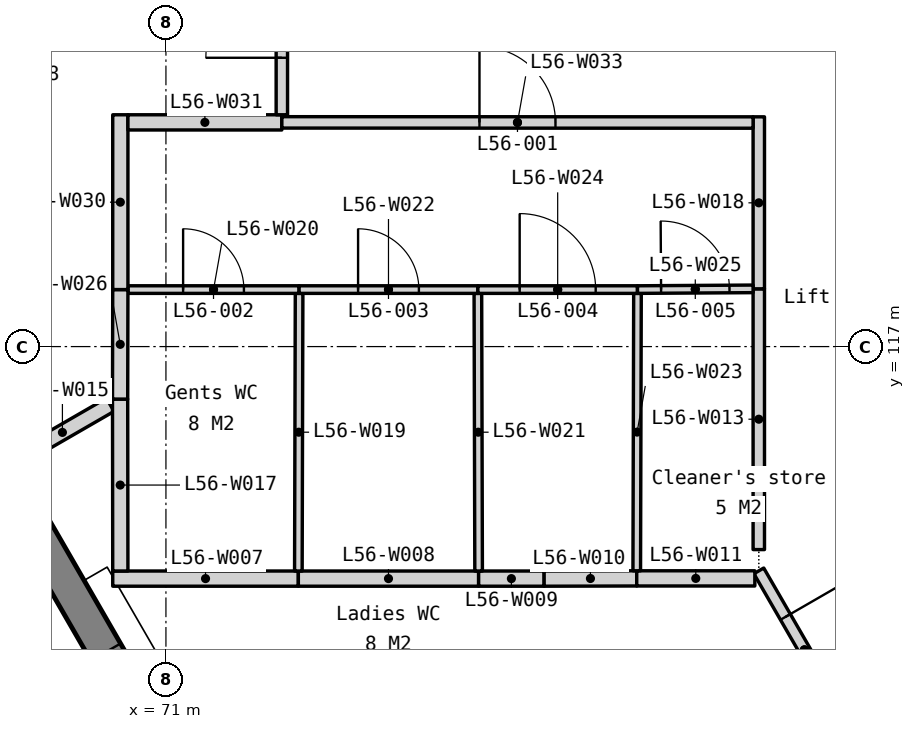
"""IFC4 building model, lengths in metres.
Left out: names, types, materials, properties, quantities, classifications, styles, units other than length and angle.
Written with IfcOpenShell. Run it as: python <this file> out.ifc"""

import sys

from ifc_helpers import new_model, si_unit, direction, frame, frame_2d, origin, place, context, subcontext, project, spatial, polyline, rectangle, outline, extrude, element, fill, save


model = new_model("IFC4")
c1 = context("Model", 3, precision=1e-05, world=origin(), true_north=direction((0.0, 1.0)))
c2 = subcontext(c1, "Body", "Model", "MODEL_VIEW")
j1 = project(units=[si_unit("LENGTHUNIT", "METRE"), si_unit("PLANEANGLEUNIT", "RADIAN")], contexts=[c1])
p1 = place(None, origin())
s1 = spatial("IfcSite", under=j1, at=p1, CompositionType="ELEMENT")
p2 = place(p1, origin())
s2 = spatial("IfcBuilding", under=s1, at=p2, CompositionType="ELEMENT")
p3 = place(p2, frame((0.0, 0.0, 223.1)))
s3 = spatial("IfcBuildingStorey", under=s2, at=p3, CompositionType="ELEMENT", Elevation=223.1)
p4 = place(p3, frame((59.13, 132.168, -0.15), z_axis=(0.0, 0.0, 1.0), x_axis=(0.500002199942, -0.866024133644, 0.0)))
e1 = element("IfcWall", 1, at=p4, inside=s3, PredefinedType="SOLIDWALL", context=c2, shape_type="SweptSolid", body=[
    extrude(outline(polyline([(38.729, 0.0), (38.729, 3.75), (0.0, 3.75), (0.0, 0.0), (38.729, 0.0)])), frame((0.0, 0.225, 0.0), z_axis=(0.0, -1.0, 0.0), x_axis=(1.0, 0.0, 0.0)), (0.0, 0.0, 1.0), 0.45),
])
p5 = place(p4, frame((2.791, 0.0, 0.95)))
e2 = element("IfcOpeningElement", 2, at=p5, cuts=e1, PredefinedType="OPENING", context=c2, shape_type="SweptSolid", body=[
    extrude(rectangle(XDim=1.8, YDim=2.2, at=frame_2d((0.9, 1.1))), frame((0.0, 0.235, 0.0), z_axis=(0.0, -1.0, 0.0), x_axis=(1.0, 0.0, 0.0)), (0.0, 0.0, 1.0), 0.47),
])
p6 = place(p4, frame((5.091, 0.0, 0.95)))
e3 = element("IfcOpeningElement", 3, at=p6, cuts=e1, PredefinedType="OPENING", context=c2, shape_type="SweptSolid", body=[
    extrude(rectangle(XDim=1.8, YDim=2.2, at=frame_2d((0.9, 1.1))), frame((0.0, 0.235, 0.0), z_axis=(0.0, -1.0, 0.0), x_axis=(1.0, 0.0, 0.0)), (0.0, 0.0, 1.0), 0.47),
])
p7 = place(p4, frame((12.473, 0.0, 0.95)))
e4 = element("IfcOpeningElement", 4, at=p7, cuts=e1, PredefinedType="OPENING", context=c2, shape_type="SweptSolid", body=[
    extrude(rectangle(XDim=1.8, YDim=2.2, at=frame_2d((0.9, 1.1))), frame((0.0, 0.235, 0.0), z_axis=(0.0, -1.0, 0.0), x_axis=(1.0, 0.0, 0.0)), (0.0, 0.0, 1.0), 0.47),
])
p8 = place(p4, frame((14.773, 0.0, 0.95)))
e5 = element("IfcOpeningElement", 5, at=p8, cuts=e1, PredefinedType="OPENING", context=c2, shape_type="SweptSolid", body=[
    extrude(rectangle(XDim=1.8, YDim=2.2, at=frame_2d((0.9, 1.1))), frame((0.0, 0.235, 0.0), z_axis=(0.0, -1.0, 0.0), x_axis=(1.0, 0.0, 0.0)), (0.0, 0.0, 1.0), 0.47),
])
p9 = place(p4, frame((22.156, 0.0, 0.95)))
e6 = element("IfcOpeningElement", 6, at=p9, cuts=e1, PredefinedType="OPENING", context=c2, shape_type="SweptSolid", body=[
    extrude(rectangle(XDim=1.8, YDim=2.2, at=frame_2d((0.9, 1.1))), frame((0.0, 0.235, 0.0), z_axis=(0.0, -1.0, 0.0), x_axis=(1.0, 0.0, 0.0)), (0.0, 0.0, 1.0), 0.47),
])
p10 = place(p4, frame((24.456, 0.0, 0.95)))
e7 = element("IfcOpeningElement", 7, at=p10, cuts=e1, PredefinedType="OPENING", context=c2, shape_type="SweptSolid", body=[
    extrude(rectangle(XDim=1.8, YDim=2.2, at=frame_2d((0.9, 1.1))), frame((0.0, 0.235, 0.0), z_axis=(0.0, -1.0, 0.0), x_axis=(1.0, 0.0, 0.0)), (0.0, 0.0, 1.0), 0.47),
])
p11 = place(p4, frame((31.838, 0.0, 0.95)))
e8 = element("IfcOpeningElement", 8, at=p11, cuts=e1, PredefinedType="OPENING", context=c2, shape_type="SweptSolid", body=[
    extrude(rectangle(XDim=1.8, YDim=2.2, at=frame_2d((0.9, 1.1))), frame((0.0, 0.235, 0.0), z_axis=(0.0, -1.0, 0.0), x_axis=(1.0, 0.0, 0.0)), (0.0, 0.0, 1.0), 0.47),
])
p12 = place(p4, frame((34.138, 0.0, 0.95)))
e9 = element("IfcOpeningElement", 9, at=p12, cuts=e1, PredefinedType="OPENING", context=c2, shape_type="SweptSolid", body=[
    extrude(rectangle(XDim=1.8, YDim=2.2, at=frame_2d((0.9, 1.1))), frame((0.0, 0.235, 0.0), z_axis=(0.0, -1.0, 0.0), x_axis=(1.0, 0.0, 0.0)), (0.0, 0.0, 1.0), 0.47),
])
p13 = place(p3, frame((78.8, 114.049, 0.0), z_axis=(0.0, 0.0, 1.0), x_axis=(0.500001309137, -0.866024647952, 0.0)))
e10 = element("IfcWall", 10, at=p13, inside=s3, PredefinedType="PARTITIONING", context=c2, shape_type="SweptSolid", body=[
    extrude(rectangle(XDim=2.4, YDim=0.15, at=frame_2d((1.2, 0.0))), origin(), (0.0, 0.0, 1.0), 3.6),
])
p14 = place(p13, frame((0.7, 0.0, 0.0)))
e11 = element("IfcOpeningElement", 11, at=p14, cuts=e10, PredefinedType="OPENING", context=c2, shape_type="SweptSolid", body=[
    extrude(rectangle(XDim=1.0, YDim=2.1, at=frame_2d((0.5, 1.05))), frame((0.0, 0.085, 0.0), z_axis=(0.0, -1.0, 0.0), x_axis=(1.0, 0.0, 0.0)), (0.0, 0.0, 1.0), 0.17),
])
p15 = place(p3, frame((70.3, 113.947, 0.0), z_axis=(0.0, 0.0, 1.0), x_axis=(1.0, 0.0, 0.0)))
e12 = element("IfcWall", 12, at=p15, inside=s3, PredefinedType="PARTITIONING", context=c2, shape_type="SweptSolid", body=[
    extrude(rectangle(XDim=2.442, YDim=0.2, at=frame_2d((1.221, 0.0))), origin(), (0.0, 0.0, 1.0), 3.6),
])
p16 = place(p3, frame((72.742, 113.947, 0.0), z_axis=(0.0, 0.0, 1.0), x_axis=(1.0, 0.0, 0.0)))
e13 = element("IfcWall", 13, at=p16, inside=s3, PredefinedType="PARTITIONING", context=c2, shape_type="SweptSolid", body=[
    extrude(rectangle(XDim=2.372, YDim=0.2, at=frame_2d((1.186, 0.0))), origin(), (0.0, 0.0, 1.0), 3.6),
])
p17 = place(p3, frame((75.114, 113.947, 0.0), z_axis=(0.0, 0.0, 1.0), x_axis=(1.0, 0.0, 0.0)))
e14 = element("IfcWall", 14, at=p17, inside=s3, PredefinedType="PARTITIONING", context=c2, shape_type="SweptSolid", body=[
    extrude(rectangle(XDim=0.862, YDim=0.2, at=frame_2d((0.431, 0.0))), origin(), (0.0, 0.0, 1.0), 3.6),
])
p18 = place(p3, frame((75.976, 113.947, 0.0), z_axis=(0.0, 0.0, 1.0), x_axis=(0.999997107299, 0.002405284684, 0.0)))
e15 = element("IfcWall", 15, at=p18, inside=s3, PredefinedType="PARTITIONING", context=c2, shape_type="SweptSolid", body=[
    extrude(rectangle(XDim=1.218, YDim=0.2, at=frame_2d((0.609, 0.0))), origin(), (0.0, 0.0, 1.0), 3.6),
])
p19 = place(p3, frame((77.194, 113.95, 0.0), z_axis=(0.0, 0.0, 1.0), x_axis=(1.0, 0.0, 0.0)))
e16 = element("IfcWall", 16, at=p19, inside=s3, PredefinedType="PARTITIONING", context=c2, shape_type="SweptSolid", body=[
    extrude(rectangle(XDim=1.554, YDim=0.2, at=frame_2d((0.777, 0.0))), origin(), (0.0, 0.0, 1.0), 3.6),
])
p20 = place(p3, frame((78.8, 114.329, 0.0), z_axis=(0.0, 0.0, 1.0), x_axis=(0.0, 1.0, 0.0)))
e17 = element("IfcWall", 17, at=p20, inside=s3, PredefinedType="PARTITIONING", context=c2, shape_type="SweptSolid", body=[
    extrude(rectangle(XDim=3.431, YDim=0.15, at=frame_2d((1.716, 0.0))), origin(), (0.0, 0.0, 1.0), 3.6),
])
p21 = place(p3, frame((69.009, 115.508, 0.0), z_axis=(0.0, 0.0, 1.0), x_axis=(0.865958882005, 0.500115201406, 0.0)))
e18 = element("IfcWall", 18, at=p21, inside=s3, PredefinedType="PARTITIONING", context=c2, shape_type="SweptSolid", body=[
    extrude(rectangle(XDim=1.453, YDim=0.2, at=frame_2d((0.727, 0.0))), origin(), (0.0, 0.0, 1.0), 3.6),
])
p22 = place(p3, frame((70.4, 114.047, 0.0), z_axis=(0.0, 0.0, 1.0), x_axis=(-0.001295195892, 0.999999161233, 0.0)))
e19 = element("IfcWall", 19, at=p22, inside=s3, PredefinedType="PARTITIONING", context=c2, shape_type="SweptSolid", body=[
    extrude(rectangle(XDim=2.262, YDim=0.2, at=frame_2d((1.131, 0.0))), origin(), (0.0, 0.0, 1.0), 3.6),
])
p23 = place(p3, frame((78.8, 117.76, 0.0), z_axis=(0.0, 0.0, 1.0), x_axis=(0.0, 1.0, 0.0)))
e20 = element("IfcWall", 20, at=p23, inside=s3, PredefinedType="PARTITIONING", context=c2, shape_type="SweptSolid", body=[
    extrude(rectangle(XDim=2.263, YDim=0.15, at=frame_2d((1.131, 0.0))), origin(), (0.0, 0.0, 1.0), 3.6),
])
p24 = place(p3, frame((72.742, 114.047, 0.0), z_axis=(0.0, 0.0, 1.0), x_axis=(0.002673429826, 0.99999642638, 0.0)))
e21 = element("IfcWall", 21, at=p24, inside=s3, PredefinedType="PARTITIONING", context=c2, shape_type="SweptSolid", body=[
    extrude(rectangle(XDim=3.653, YDim=0.1, at=frame_2d((1.826, 0.0))), origin(), (0.0, 0.0, 1.0), 3.6),
])
p25 = place(p3, frame((70.5, 117.75, 0.0), z_axis=(0.0, 0.0, 1.0), x_axis=(1.0, 0.0, 0.0)))
e22 = element("IfcWall", 22, at=p25, inside=s3, PredefinedType="PARTITIONING", context=c2, shape_type="SweptSolid", body=[
    extrude(rectangle(XDim=2.252, YDim=0.1, at=frame_2d((1.126, 0.0))), origin(), (0.0, 0.0, 1.0), 3.6),
])
p26 = place(p25, frame((0.726, 0.0, 0.0)))
e23 = element("IfcOpeningElement", 23, at=p26, cuts=e22, PredefinedType="OPENING", context=c2, shape_type="SweptSolid", body=[
    extrude(rectangle(XDim=0.8, YDim=2.1, at=frame_2d((0.4, 1.05))), frame((0.0, 0.06, 0.0), z_axis=(0.0, -1.0, 0.0), x_axis=(1.0, 0.0, 0.0)), (0.0, 0.0, 1.0), 0.12),
])
p27 = place(p3, frame((75.114, 114.047, 0.0), z_axis=(0.0, 0.0, 1.0), x_axis=(-0.00260659454, 0.999996602827, 0.0)))
e24 = element("IfcWall", 24, at=p27, inside=s3, PredefinedType="PARTITIONING", context=c2, shape_type="SweptSolid", body=[
    extrude(rectangle(XDim=3.653, YDim=0.1, at=frame_2d((1.826, 0.0))), origin(), (0.0, 0.0, 1.0), 3.6),
])
p28 = place(p3, frame((72.752, 117.75, 0.0), z_axis=(0.0, 0.0, 1.0), x_axis=(1.0, 0.0, 0.0)))
e25 = element("IfcWall", 25, at=p28, inside=s3, PredefinedType="PARTITIONING", context=c2, shape_type="SweptSolid", body=[
    extrude(rectangle(XDim=2.352, YDim=0.1, at=frame_2d((1.176, 0.0))), origin(), (0.0, 0.0, 1.0), 3.6),
])
p29 = place(p28, frame((0.776, 0.0, 0.0)))
e26 = element("IfcOpeningElement", 26, at=p29, cuts=e25, PredefinedType="OPENING", context=c2, shape_type="SweptSolid", body=[
    extrude(rectangle(XDim=0.8, YDim=2.1, at=frame_2d((0.4, 1.05))), frame((0.0, 0.06, 0.0), z_axis=(0.0, -1.0, 0.0), x_axis=(1.0, 0.0, 0.0)), (0.0, 0.0, 1.0), 0.12),
])
p30 = place(p3, frame((77.194, 114.05, 0.0), z_axis=(0.0, 0.0, 1.0), x_axis=(0.002608686776, 0.999996597371, 0.0)))
e27 = element("IfcWall", 27, at=p30, inside=s3, PredefinedType="PARTITIONING", context=c2, shape_type="SweptSolid", body=[
    extrude(rectangle(XDim=3.65, YDim=0.1, at=frame_2d((1.825, 0.0))), origin(), (0.0, 0.0, 1.0), 3.6),
])
p31 = place(p3, frame((75.104, 117.75, 0.0), z_axis=(0.0, 0.0, 1.0), x_axis=(1.0, 0.0, 0.0)))
e28 = element("IfcWall", 28, at=p31, inside=s3, PredefinedType="PARTITIONING", context=c2, shape_type="SweptSolid", body=[
    extrude(rectangle(XDim=2.1, YDim=0.1, at=frame_2d((1.05, 0.0))), origin(), (0.0, 0.0, 1.0), 3.6),
])
p32 = place(p31, frame((0.55, 0.0, 0.0)))
e29 = element("IfcOpeningElement", 29, at=p32, cuts=e28, PredefinedType="OPENING", context=c2, shape_type="SweptSolid", body=[
    extrude(rectangle(XDim=1.0, YDim=2.1, at=frame_2d((0.5, 1.05))), frame((0.0, 0.06, 0.0), z_axis=(0.0, -1.0, 0.0), x_axis=(1.0, 0.0, 0.0)), (0.0, 0.0, 1.0), 0.12),
])
p33 = place(p3, frame((77.204, 117.75, 0.0), z_axis=(0.0, 0.0, 1.0), x_axis=(0.999980406575, 0.006259909447, 0.0)))
e30 = element("IfcWall", 30, at=p33, inside=s3, PredefinedType="PARTITIONING", context=c2, shape_type="SweptSolid", body=[
    extrude(rectangle(XDim=1.521, YDim=0.1, at=frame_2d((0.76, 0.0))), origin(), (0.0, 0.0, 1.0), 3.6),
])
p34 = place(p33, frame((0.311, 0.0, 0.0)))
e31 = element("IfcOpeningElement", 31, at=p34, cuts=e30, PredefinedType="OPENING", context=c2, shape_type="SweptSolid", body=[
    extrude(rectangle(XDim=0.9, YDim=2.1, at=frame_2d((0.45, 1.05))), frame((0.0, 0.06, 0.0), z_axis=(0.0, -1.0, 0.0), x_axis=(1.0, 0.0, 0.0)), (0.0, 0.0, 1.0), 0.12),
])
p35 = place(p3, frame((70.397, 116.309, 0.0), z_axis=(0.0, 0.0, 1.0), x_axis=(0.002033204879, 0.999997933037, 0.0)))
e32 = element("IfcWall", 32, at=p35, inside=s3, PredefinedType="PARTITIONING", context=c2, shape_type="SweptSolid", body=[
    extrude(rectangle(XDim=1.441, YDim=0.2, at=frame_2d((0.72, 0.0))), origin(), (0.0, 0.0, 1.0), 3.6),
])
p36 = place(p3, frame((66.587, 119.703, 0.0), z_axis=(0.0, 0.0, 1.0), x_axis=(0.866023511746, 0.500003277092, 0.0)))
e33 = element("IfcWall", 33, at=p36, inside=s3, PredefinedType="PARTITIONING", context=c2, shape_type="SweptSolid", body=[
    extrude(rectangle(XDim=5.694, YDim=0.1, at=frame_2d((2.847, 0.0))), origin(), (0.0, 0.0, 1.0), 3.6),
])
p37 = place(p36, frame((2.397, 0.0, 0.0)))
e34 = element("IfcOpeningElement", 34, at=p37, cuts=e33, PredefinedType="OPENING", context=c2, shape_type="SweptSolid", body=[
    extrude(rectangle(XDim=0.9, YDim=2.1, at=frame_2d((0.45, 1.05))), frame((0.0, 0.06, 0.0), z_axis=(0.0, -1.0, 0.0), x_axis=(1.0, 0.0, 0.0)), (0.0, 0.0, 1.0), 0.12),
])
p38 = place(p3, frame((70.4, 117.75, 0.0), z_axis=(0.0, 0.0, 1.0), x_axis=(0.0, 1.0, 0.0)))
e35 = element("IfcWall", 35, at=p38, inside=s3, PredefinedType="PARTITIONING", context=c2, shape_type="SweptSolid", body=[
    extrude(rectangle(XDim=2.3, YDim=0.2, at=frame_2d((1.15, 0.0))), origin(), (0.0, 0.0, 1.0), 3.6),
])
p39 = place(p3, frame((70.5, 119.95, 0.0), z_axis=(0.0, 0.0, 1.0), x_axis=(1.0, 0.0, 0.0)))
e36 = element("IfcWall", 36, at=p39, inside=s3, PredefinedType="PARTITIONING", context=c2, shape_type="SweptSolid", body=[
    extrude(rectangle(XDim=2.025, YDim=0.2, at=frame_2d((1.012, 0.0))), origin(), (0.0, 0.0, 1.0), 3.6),
])
p40 = place(p3, frame((72.525, 120.05, 0.0), z_axis=(0.0, 0.0, 1.0), x_axis=(0.0, 1.0, 0.0)))
e37 = element("IfcWall", 37, at=p40, inside=s3, PredefinedType="PARTITIONING", context=c2, shape_type="SweptSolid", body=[
    extrude(rectangle(XDim=2.5, YDim=0.15, at=frame_2d((1.25, 0.0))), origin(), (0.0, 0.0, 1.0), 3.6),
])
p41 = place(p40, frame((0.75, 0.0, 0.0)))
e38 = element("IfcOpeningElement", 38, at=p41, cuts=e37, PredefinedType="OPENING", context=c2, shape_type="SweptSolid", body=[
    extrude(rectangle(XDim=1.0, YDim=2.1, at=frame_2d((0.5, 1.05))), frame((0.0, 0.085, 0.0), z_axis=(0.0, -1.0, 0.0), x_axis=(1.0, 0.0, 0.0)), (0.0, 0.0, 1.0), 0.17),
])
p42 = place(p3, frame((72.525, 119.95, 0.0), z_axis=(0.0, 0.0, 1.0), x_axis=(0.999999950384, -0.000315010222, 0.0)))
e39 = element("IfcWall", 39, at=p42, inside=s3, PredefinedType="PARTITIONING", context=c2, shape_type="SweptSolid", body=[
    extrude(rectangle(XDim=6.2, YDim=0.15, at=frame_2d((3.1, 0.0))), origin(), (0.0, 0.0, 1.0), 3.6),
])
p43 = place(p42, frame((2.6, 0.0, 0.0)))
e40 = element("IfcOpeningElement", 40, at=p43, cuts=e39, PredefinedType="OPENING", context=c2, shape_type="SweptSolid", body=[
    extrude(rectangle(XDim=1.0, YDim=2.1, at=frame_2d((0.5, 1.05))), frame((0.0, 0.085, 0.0), z_axis=(0.0, -1.0, 0.0), x_axis=(1.0, 0.0, 0.0)), (0.0, 0.0, 1.0), 0.17),
])
p44 = place(p43, origin())
e41 = element("IfcDoor", 41, at=p44, inside=s3, OperationType="SINGLE_SWING_LEFT", PredefinedType="DOOR", context=c2, shape_type="SweptSolid", body=[
    extrude(rectangle(XDim=1.0, YDim=2.1, at=frame_2d((0.5, 1.05))), frame((0.0, 0.025, 0.0), z_axis=(0.0, -1.0, 0.0), x_axis=(1.0, 0.0, 0.0)), (0.0, 0.0, 1.0), 0.05),
])
fill(e40, e41)
p45 = place(p26, origin())
e42 = element("IfcDoor", 42, at=p45, inside=s3, OperationType="SINGLE_SWING_LEFT", PredefinedType="DOOR", context=c2, shape_type="SweptSolid", body=[
    extrude(rectangle(XDim=0.8, YDim=2.1, at=frame_2d((0.4, 1.05))), frame((0.0, 0.025, 0.0), z_axis=(0.0, -1.0, 0.0), x_axis=(1.0, 0.0, 0.0)), (0.0, 0.0, 1.0), 0.05),
])
fill(e23, e42)
p46 = place(p29, origin())
e43 = element("IfcDoor", 43, at=p46, inside=s3, OperationType="SINGLE_SWING_LEFT", PredefinedType="DOOR", context=c2, shape_type="SweptSolid", body=[
    extrude(rectangle(XDim=0.8, YDim=2.1, at=frame_2d((0.4, 1.05))), frame((0.0, 0.025, 0.0), z_axis=(0.0, -1.0, 0.0), x_axis=(1.0, 0.0, 0.0)), (0.0, 0.0, 1.0), 0.05),
])
fill(e26, e43)
p47 = place(p32, origin())
e44 = element("IfcDoor", 44, at=p47, inside=s3, OperationType="SINGLE_SWING_LEFT", PredefinedType="DOOR", context=c2, shape_type="SweptSolid", body=[
    extrude(rectangle(XDim=1.0, YDim=2.1, at=frame_2d((0.5, 1.05))), frame((0.0, 0.025, 0.0), z_axis=(0.0, -1.0, 0.0), x_axis=(1.0, 0.0, 0.0)), (0.0, 0.0, 1.0), 0.05),
])
fill(e29, e44)
p48 = place(p34, origin())
e45 = element("IfcDoor", 45, at=p48, inside=s3, OperationType="SINGLE_SWING_LEFT", PredefinedType="DOOR", context=c2, shape_type="SweptSolid", body=[
    extrude(rectangle(XDim=0.9, YDim=2.1, at=frame_2d((0.45, 1.05))), frame((0.0, 0.025, 0.0), z_axis=(0.0, -1.0, 0.0), x_axis=(1.0, 0.0, 0.0)), (0.0, 0.0, 1.0), 0.05),
])
fill(e31, e45)
p49 = place(p41, origin())
e46 = element("IfcDoor", 46, at=p49, inside=s3, OperationType="SINGLE_SWING_LEFT", PredefinedType="DOOR", context=c2, shape_type="SweptSolid", body=[
    extrude(rectangle(XDim=1.0, YDim=2.1, at=frame_2d((0.5, 1.05))), frame((0.0, 0.025, 0.0), z_axis=(0.0, -1.0, 0.0), x_axis=(1.0, 0.0, 0.0)), (0.0, 0.0, 1.0), 0.05),
])
fill(e38, e46)
p50 = place(p14, origin())
e47 = element("IfcDoor", 47, at=p50, inside=s3, OperationType="SINGLE_SWING_LEFT", PredefinedType="DOOR", context=c2, shape_type="SweptSolid", body=[
    extrude(rectangle(XDim=1.0, YDim=2.1, at=frame_2d((0.5, 1.05))), frame((0.0, 0.025, 0.0), z_axis=(0.0, -1.0, 0.0), x_axis=(1.0, 0.0, 0.0)), (0.0, 0.0, 1.0), 0.05),
])
fill(e11, e47)
save(model, sys.argv[1])
